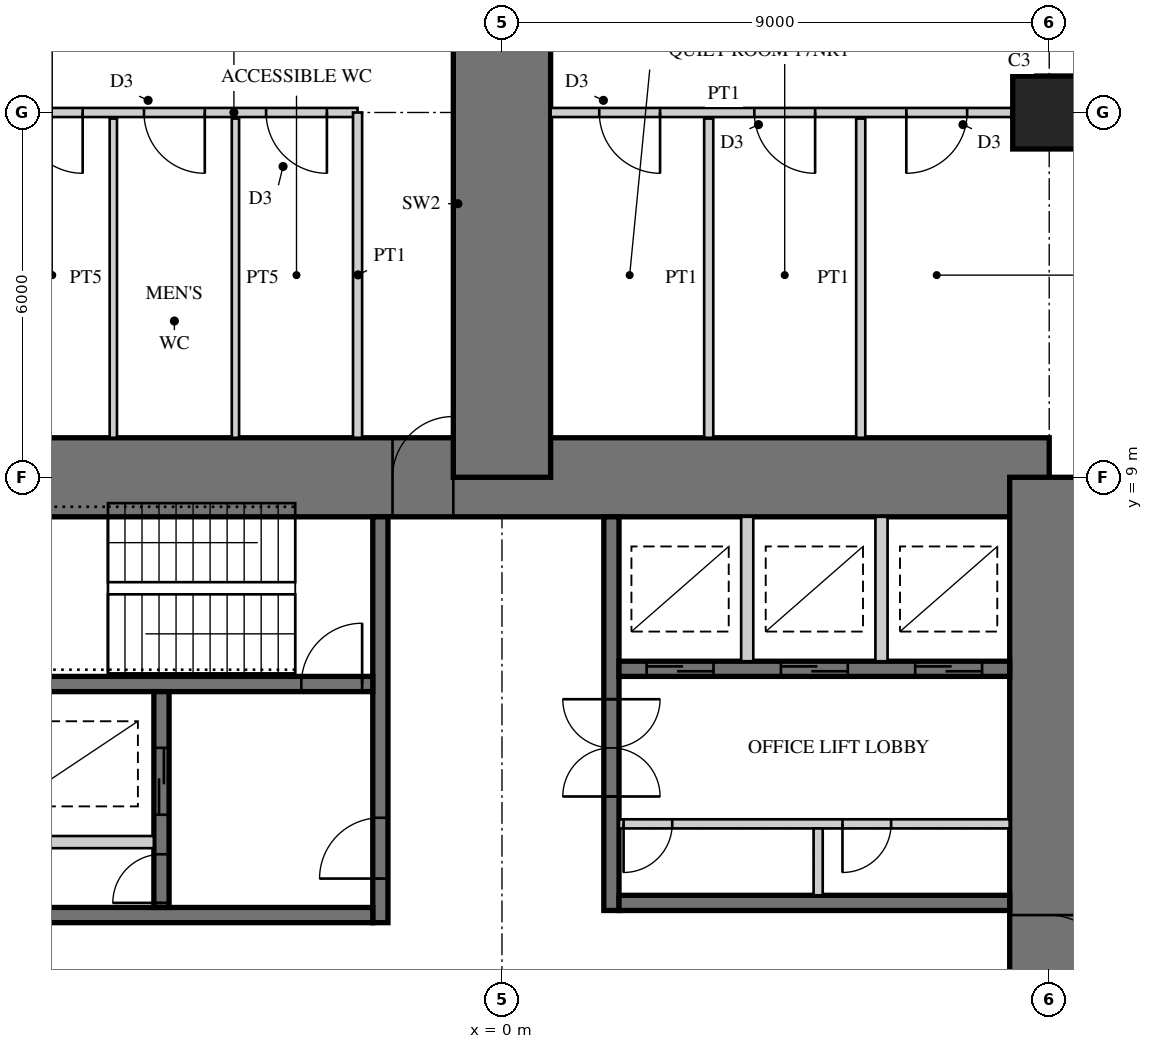
"""IFC4 building model, lengths in metres.
Left out: names, types, materials, properties, quantities, classifications, styles, units other than length and angle.
Written with IfcOpenShell. Run it as: python <this file> out.ifc"""

import sys

from ifc_helpers import new_model, si_unit, direction, frame, frame_2d, origin, origin_2d, place, context, subcontext, project, spatial, rectangle, extrude, element, fill, save


model = new_model("IFC4")
c1 = context("Model", 3, precision=1e-05, world=origin(), true_north=direction((0.0, 1.0)))
c2 = subcontext(c1, "Body", "Model", "MODEL_VIEW")
j1 = project(units=[si_unit("LENGTHUNIT", "METRE"), si_unit("PLANEANGLEUNIT", "RADIAN")], contexts=[c1])
p1 = place(None, origin())
s1 = spatial("IfcSite", under=j1, at=p1, CompositionType="ELEMENT")
p2 = place(p1, origin())
s2 = spatial("IfcBuilding", under=s1, at=p2, CompositionType="ELEMENT")
p3 = place(p2, frame((0.0, 0.0, 71.5)))
s3 = spatial("IfcBuildingStorey", under=s2, at=p3, CompositionType="ELEMENT", Elevation=71.5)
p4 = place(p3, frame((9.0, 9.0, 0.0), z_axis=(0.0, 0.0, 1.0), x_axis=(-1.0, 0.0, 0.0)))
e1 = element("IfcWall", 1, at=p4, inside=s3, PredefinedType="SHEAR", context=c2, shape_type="SweptSolid", body=[
    extrude(rectangle(XDim=18.0, YDim=1.3, at=frame_2d((9.0, 0.0))), origin(), (0.0, 0.0, 1.0), 4.0),
])
p5 = place(p4, frame((9.8, 0.0, 0.0)))
e2 = element("IfcOpeningElement", 2, at=p5, cuts=e1, PredefinedType="OPENING", context=c2, shape_type="SweptSolid", body=[
    extrude(rectangle(XDim=1.0, YDim=2.4, at=frame_2d((0.5, 1.2))), frame((0.0, 0.66, 0.0), z_axis=(0.0, -1.0, 0.0), x_axis=(1.0, 0.0, 0.0)), (0.0, 0.0, 1.0), 1.32),
])
p6 = place(p3, frame((9.0, -9.0, 0.0), z_axis=(0.0, 0.0, 1.0), x_axis=(0.0, 1.0, 0.0)))
e3 = element("IfcWall", 3, at=p6, inside=s3, PredefinedType="SHEAR", context=c2, shape_type="SweptSolid", body=[
    extrude(rectangle(XDim=18.0, YDim=1.3, at=frame_2d((9.0, 0.0))), origin(), (0.0, 0.0, 1.0), 4.0),
])
p7 = place(p6, frame((9.8, 0.0, 0.0)))
e4 = element("IfcOpeningElement", 4, at=p7, cuts=e3, PredefinedType="OPENING", context=c2, shape_type="SweptSolid", body=[
    extrude(rectangle(XDim=1.0, YDim=2.4, at=frame_2d((0.5, 1.2))), frame((0.0, 0.66, 0.0), z_axis=(0.0, -1.0, 0.0), x_axis=(1.0, 0.0, 0.0)), (0.0, 0.0, 1.0), 1.32),
])
p8 = place(p3, frame((1.8, 1.875, 0.0), z_axis=(0.0, 0.0, 1.0), x_axis=(0.0, 1.0, 0.0)))
e5 = element("IfcWall", 5, at=p8, inside=s3, PredefinedType="SHEAR", context=c2, shape_type="SweptSolid", body=[
    extrude(rectangle(XDim=6.475, YDim=0.25, at=frame_2d((3.238, 0.0))), origin(), (0.0, 0.0, 1.0), 4.0),
])
p9 = place(p8, frame((1.875, 0.0, 0.0)))
e6 = element("IfcOpeningElement", 6, at=p9, cuts=e5, PredefinedType="OPENING", context=c2, shape_type="SweptSolid", body=[
    extrude(rectangle(XDim=1.6, YDim=2.4, at=frame_2d((0.8, 1.2))), frame((0.0, 0.135, 0.0), z_axis=(0.0, -1.0, 0.0), x_axis=(1.0, 0.0, 0.0)), (0.0, 0.0, 1.0), 0.27),
])
p10 = place(p3, frame((1.925, 2.0, 0.0), z_axis=(0.0, 0.0, 1.0), x_axis=(1.0, 0.0, 0.0)))
e7 = element("IfcWall", 7, at=p10, inside=s3, PredefinedType="SHEAR", context=c2, shape_type="SweptSolid", body=[
    extrude(rectangle(XDim=6.425, YDim=0.25, at=frame_2d((3.212, 0.0))), origin(), (0.0, 0.0, 1.0), 4.0),
])
p11 = place(p3, frame((1.925, 5.85, 0.0), z_axis=(0.0, 0.0, 1.0), x_axis=(1.0, 0.0, 0.0)))
e8 = element("IfcWall", 8, at=p11, inside=s3, PredefinedType="SHEAR", context=c2, shape_type="SweptSolid", body=[
    extrude(rectangle(XDim=6.425, YDim=0.25, at=frame_2d((3.212, 0.0))), origin(), (0.0, 0.0, 1.0), 4.0),
])
p12 = place(p11, frame((0.454, 0.0, 0.0)))
e9 = element("IfcOpeningElement", 9, at=p12, cuts=e8, PredefinedType="OPENING", context=c2, shape_type="SweptSolid", body=[
    extrude(rectangle(XDim=1.1, YDim=2.2, at=frame_2d((0.55, 1.1))), frame((0.0, 0.135, 0.0), z_axis=(0.0, -1.0, 0.0), x_axis=(1.0, 0.0, 0.0)), (0.0, 0.0, 1.0), 0.27),
])
p13 = place(p11, frame((2.663, 0.0, 0.0)))
e10 = element("IfcOpeningElement", 10, at=p13, cuts=e8, PredefinedType="OPENING", context=c2, shape_type="SweptSolid", body=[
    extrude(rectangle(XDim=1.1, YDim=2.2, at=frame_2d((0.55, 1.1))), frame((0.0, 0.135, 0.0), z_axis=(0.0, -1.0, 0.0), x_axis=(1.0, 0.0, 0.0)), (0.0, 0.0, 1.0), 0.27),
])
p14 = place(p11, frame((4.871, 0.0, 0.0)))
e11 = element("IfcOpeningElement", 11, at=p14, cuts=e8, PredefinedType="OPENING", context=c2, shape_type="SweptSolid", body=[
    extrude(rectangle(XDim=1.1, YDim=2.2, at=frame_2d((0.55, 1.1))), frame((0.0, 0.135, 0.0), z_axis=(0.0, -1.0, 0.0), x_axis=(1.0, 0.0, 0.0)), (0.0, 0.0, 1.0), 0.27),
])
p15 = place(p3, frame((1.925, 3.3, 0.0), z_axis=(0.0, 0.0, 1.0), x_axis=(1.0, 0.0, 0.0)))
e12 = element("IfcWall", 12, at=p15, inside=s3, PredefinedType="PARTITIONING", context=c2, shape_type="SweptSolid", body=[
    extrude(rectangle(XDim=6.425, YDim=0.15, at=frame_2d((3.212, 0.0))), origin(), (0.0, 0.0, 1.0), 4.0),
])
p16 = place(p15, frame((0.075, 0.0, 0.0)))
e13 = element("IfcOpeningElement", 13, at=p16, cuts=e12, PredefinedType="OPENING", context=c2, shape_type="SweptSolid", body=[
    extrude(rectangle(XDim=0.8, YDim=2.1, at=frame_2d((0.4, 1.05))), frame((0.0, 0.085, 0.0), z_axis=(0.0, -1.0, 0.0), x_axis=(1.0, 0.0, 0.0)), (0.0, 0.0, 1.0), 0.17),
])
p17 = place(p15, frame((3.675, 0.0, 0.0)))
e14 = element("IfcOpeningElement", 14, at=p17, cuts=e12, PredefinedType="OPENING", context=c2, shape_type="SweptSolid", body=[
    extrude(rectangle(XDim=0.8, YDim=2.1, at=frame_2d((0.4, 1.05))), frame((0.0, 0.085, 0.0), z_axis=(0.0, -1.0, 0.0), x_axis=(1.0, 0.0, 0.0)), (0.0, 0.0, 1.0), 0.17),
])
p18 = place(p3, frame((5.2, 2.125, 0.0), z_axis=(0.0, 0.0, 1.0), x_axis=(0.0, 1.0, 0.0)))
e15 = element("IfcWall", 15, at=p18, inside=s3, PredefinedType="PARTITIONING", context=c2, shape_type="SweptSolid", body=[
    extrude(rectangle(XDim=1.1, YDim=0.15, at=frame_2d((0.55, 0.0))), origin(), (0.0, 0.0, 1.0), 4.0),
])
for number, where, z_axis, x_axis in (
    (16, (4.033, 5.975, 0.0), (0.0, 0.0, 1.0), (0.0, 1.0, 0.0)),
    (17, (6.242, 5.975, 0.0), (0.0, 0.0, 1.0), (0.0, 1.0, 0.0)),
):
    element("IfcWall", number, at=place(p3, frame(where, z_axis=z_axis, x_axis=x_axis)), inside=s3, PredefinedType="PARTITIONING", context=c2, shape_type="SweptSolid", body=[
        extrude(rectangle(XDim=2.375, YDim=0.2, at=frame_2d((1.188, 0.0))), origin(), (0.0, 0.0, 1.0), 4.0),
    ])
p19 = place(p3, frame((-2.0, 1.675, 0.0), z_axis=(0.0, 0.0, 1.0), x_axis=(0.0, 1.0, 0.0)))
e18 = element("IfcWall", 18, at=p19, inside=s3, PredefinedType="SHEAR", context=c2, shape_type="SweptSolid", body=[
    extrude(rectangle(XDim=6.675, YDim=0.25, at=frame_2d((3.337, 0.0))), origin(), (0.0, 0.0, 1.0), 4.0),
])
p20 = place(p19, frame((0.725, 0.0, 0.0)))
e19 = element("IfcOpeningElement", 19, at=p20, cuts=e18, PredefinedType="OPENING", context=c2, shape_type="SweptSolid", body=[
    extrude(rectangle(XDim=1.0, YDim=2.1, at=frame_2d((0.5, 1.05))), frame((0.0, 0.135, 0.0), z_axis=(0.0, -1.0, 0.0), x_axis=(1.0, 0.0, 0.0)), (0.0, 0.0, 1.0), 0.27),
])
p21 = place(p3, frame((-2.125, 1.8, 0.0), z_axis=(0.0, 0.0, 1.0), x_axis=(-1.0, 0.0, 0.0)))
e20 = element("IfcWall", 20, at=p21, inside=s3, PredefinedType="SHEAR", context=c2, shape_type="SweptSolid", body=[
    extrude(rectangle(XDim=6.225, YDim=0.25, at=frame_2d((3.113, 0.0))), origin(), (0.0, 0.0, 1.0), 4.0),
])
p22 = place(p3, frame((-2.125, 5.6, 0.0), z_axis=(0.0, 0.0, 1.0), x_axis=(-1.0, 0.0, 0.0)))
e21 = element("IfcWall", 21, at=p22, inside=s3, PredefinedType="SHEAR", context=c2, shape_type="SweptSolid", body=[
    extrude(rectangle(XDim=6.225, YDim=0.25, at=frame_2d((3.113, 0.0))), origin(), (0.0, 0.0, 1.0), 4.0),
])
p23 = place(p22, frame((0.175, 0.0, 0.0)))
e22 = element("IfcOpeningElement", 22, at=p23, cuts=e21, PredefinedType="OPENING", context=c2, shape_type="SweptSolid", body=[
    extrude(rectangle(XDim=1.0, YDim=2.1, at=frame_2d((0.5, 1.05))), frame((0.0, 0.135, 0.0), z_axis=(0.0, -1.0, 0.0), x_axis=(1.0, 0.0, 0.0)), (0.0, 0.0, 1.0), 0.27),
])
p24 = place(p3, frame((-5.6, 1.925, 0.0), z_axis=(0.0, 0.0, 1.0), x_axis=(0.0, 1.0, 0.0)))
e23 = element("IfcWall", 23, at=p24, inside=s3, PredefinedType="SHEAR", context=c2, shape_type="SweptSolid", body=[
    extrude(rectangle(XDim=3.55, YDim=0.25, at=frame_2d((1.775, 0.0))), origin(), (0.0, 0.0, 1.0), 4.0),
])
p25 = place(p24, frame((1.525, 0.0, 0.0)))
e24 = element("IfcOpeningElement", 24, at=p25, cuts=e23, PredefinedType="OPENING", context=c2, shape_type="SweptSolid", body=[
    extrude(rectangle(XDim=1.1, YDim=2.2, at=frame_2d((0.55, 1.1))), frame((0.0, 0.135, 0.0), z_axis=(0.0, -1.0, 0.0), x_axis=(1.0, 0.0, 0.0)), (0.0, 0.0, 1.0), 0.27),
])
p26 = place(p24, frame((0.075, 0.0, 0.0)))
e25 = element("IfcOpeningElement", 25, at=p26, cuts=e23, PredefinedType="OPENING", context=c2, shape_type="SweptSolid", body=[
    extrude(rectangle(XDim=0.8, YDim=2.1, at=frame_2d((0.4, 1.05))), frame((0.0, 0.135, 0.0), z_axis=(0.0, -1.0, 0.0), x_axis=(1.0, 0.0, 0.0)), (0.0, 0.0, 1.0), 0.27),
])
p27 = place(p3, frame((-5.725, 3.0, 0.0), z_axis=(0.0, 0.0, 1.0), x_axis=(-1.0, 0.0, 0.0)))
e26 = element("IfcWall", 26, at=p27, inside=s3, PredefinedType="PARTITIONING", context=c2, shape_type="SweptSolid", body=[
    extrude(rectangle(XDim=2.625, YDim=0.2, at=frame_2d((1.312, 0.0))), origin(), (0.0, 0.0, 1.0), 4.0),
])
p28 = place(p3, frame((0.0, 9.0, 0.0), z_axis=(0.0, 0.0, 1.0), x_axis=(0.0, 1.0, 0.0)))
e27 = element("IfcWall", 27, at=p28, inside=s3, PredefinedType="SHEAR", context=c2, shape_type="SweptSolid", body=[
    extrude(rectangle(XDim=9.0, YDim=1.6, at=frame_2d((4.5, 0.0))), origin(), (0.0, 0.0, 1.0), 4.0),
])
p29 = place(p3, frame((9.0, 15.0, 0.0), z_axis=(0.0, 0.0, 1.0), x_axis=(1.0, 0.0, 0.0)))
e28 = element("IfcColumn", 28, at=p29, inside=s3, PredefinedType="COLUMN", context=c2, shape_type="SweptSolid", body=[
    extrude(rectangle(XDim=1.2, YDim=1.2, at=origin_2d()), origin(), (0.0, 0.0, 1.0), 4.0),
])
p30 = place(p3, frame((-2.375, 15.0, 0.0), z_axis=(0.0, 0.0, 1.0), x_axis=(-1.0, 0.0, 0.0)))
e29 = element("IfcWall", 29, at=p30, inside=s3, PredefinedType="PARTITIONING", context=c2, shape_type="SweptSolid", body=[
    extrude(rectangle(XDim=6.025, YDim=0.15, at=frame_2d((3.012, 0.0))), origin(), (0.0, 0.0, 1.0), 2.95),
])
p31 = place(p30, frame((0.504, 0.0, 0.0)))
e30 = element("IfcOpeningElement", 30, at=p31, cuts=e29, PredefinedType="OPENING", context=c2, shape_type="SweptSolid", body=[
    extrude(rectangle(XDim=1.0, YDim=2.1, at=frame_2d((0.5, 1.05))), frame((0.0, 0.085, 0.0), z_axis=(0.0, -1.0, 0.0), x_axis=(1.0, 0.0, 0.0)), (0.0, 0.0, 1.0), 0.17),
])
p32 = place(p30, frame((2.512, 0.0, 0.0)))
e31 = element("IfcOpeningElement", 31, at=p32, cuts=e29, PredefinedType="OPENING", context=c2, shape_type="SweptSolid", body=[
    extrude(rectangle(XDim=1.0, YDim=2.1, at=frame_2d((0.5, 1.05))), frame((0.0, 0.085, 0.0), z_axis=(0.0, -1.0, 0.0), x_axis=(1.0, 0.0, 0.0)), (0.0, 0.0, 1.0), 0.17),
])
p33 = place(p30, frame((4.521, 0.0, 0.0)))
e32 = element("IfcOpeningElement", 32, at=p33, cuts=e29, PredefinedType="OPENING", context=c2, shape_type="SweptSolid", body=[
    extrude(rectangle(XDim=1.0, YDim=2.1, at=frame_2d((0.5, 1.05))), frame((0.0, 0.085, 0.0), z_axis=(0.0, -1.0, 0.0), x_axis=(1.0, 0.0, 0.0)), (0.0, 0.0, 1.0), 0.17),
])
p34 = place(p3, frame((-2.375, 9.65, 0.0), z_axis=(0.0, 0.0, 1.0), x_axis=(0.0, 1.0, 0.0)))
e33 = element("IfcWall", 33, at=p34, inside=s3, PredefinedType="PARTITIONING", context=c2, shape_type="SweptSolid", body=[
    extrude(rectangle(XDim=5.35, YDim=0.15, at=frame_2d((2.675, 0.0))), origin(), (0.0, 0.0, 1.0), 3.8),
])
for number, where, z_axis, x_axis in (
    (34, (-4.383, 9.65, 0.0), (0.0, 0.0, 1.0), (0.0, 1.0, 0.0)),
    (35, (-6.392, 9.65, 0.0), (0.0, 0.0, 1.0), (0.0, 1.0, 0.0)),
):
    element("IfcWall", number, at=place(p3, frame(where, z_axis=z_axis, x_axis=x_axis)), inside=s3, PredefinedType="PLUMBINGWALL", context=c2, shape_type="SweptSolid", body=[
        extrude(rectangle(XDim=5.25, YDim=0.12, at=frame_2d((2.625, 0.0))), origin(), (0.0, 0.0, 1.0), 3.8),
    ])
p35 = place(p3, frame((8.4, 15.0, 0.0), z_axis=(0.0, 0.0, 1.0), x_axis=(-1.0, 0.0, 0.0)))
e36 = element("IfcWall", 36, at=p35, inside=s3, PredefinedType="PARTITIONING", context=c2, shape_type="SweptSolid", body=[
    extrude(rectangle(XDim=7.6, YDim=0.15, at=frame_2d((3.8, 0.0))), origin(), (0.0, 0.0, 1.0), 2.95),
])
p36 = place(p35, frame((0.75, 0.0, 0.0)))
e37 = element("IfcOpeningElement", 37, at=p36, cuts=e36, PredefinedType="OPENING", context=c2, shape_type="SweptSolid", body=[
    extrude(rectangle(XDim=1.0, YDim=2.1, at=frame_2d((0.5, 1.05))), frame((0.0, 0.085, 0.0), z_axis=(0.0, -1.0, 0.0), x_axis=(1.0, 0.0, 0.0)), (0.0, 0.0, 1.0), 0.17),
])
p37 = place(p35, frame((3.25, 0.0, 0.0)))
e38 = element("IfcOpeningElement", 38, at=p37, cuts=e36, PredefinedType="OPENING", context=c2, shape_type="SweptSolid", body=[
    extrude(rectangle(XDim=1.0, YDim=2.1, at=frame_2d((0.5, 1.05))), frame((0.0, 0.085, 0.0), z_axis=(0.0, -1.0, 0.0), x_axis=(1.0, 0.0, 0.0)), (0.0, 0.0, 1.0), 0.17),
])
p38 = place(p35, frame((5.8, 0.0, 0.0)))
e39 = element("IfcOpeningElement", 39, at=p38, cuts=e36, PredefinedType="OPENING", context=c2, shape_type="SweptSolid", body=[
    extrude(rectangle(XDim=1.0, YDim=2.1, at=frame_2d((0.5, 1.05))), frame((0.0, 0.085, 0.0), z_axis=(0.0, -1.0, 0.0), x_axis=(1.0, 0.0, 0.0)), (0.0, 0.0, 1.0), 0.17),
])
p39 = place(p3, frame((3.4, 9.65, 0.0), z_axis=(0.0, 0.0, 1.0), x_axis=(0.0, 1.0, 0.0)))
e40 = element("IfcWall", 40, at=p39, inside=s3, PredefinedType="PARTITIONING", context=c2, shape_type="SweptSolid", body=[
    extrude(rectangle(XDim=5.25, YDim=0.15, at=frame_2d((2.625, 0.0))), origin(), (0.0, 0.0, 1.0), 3.8),
])
p40 = place(p3, frame((5.9, 9.65, 0.0), z_axis=(0.0, 0.0, 1.0), x_axis=(0.0, 1.0, 0.0)))
e41 = element("IfcWall", 41, at=p40, inside=s3, PredefinedType="PARTITIONING", context=c2, shape_type="SweptSolid", body=[
    extrude(rectangle(XDim=5.25, YDim=0.15, at=frame_2d((2.625, 0.0))), origin(), (0.0, 0.0, 1.0), 3.0),
])
p41 = place(p31, origin())
e42 = element("IfcDoor", 42, at=p41, inside=s3, OperationType="SINGLE_SWING_LEFT", PredefinedType="DOOR", context=c2, shape_type="SweptSolid", body=[
    extrude(rectangle(XDim=1.0, YDim=2.1, at=frame_2d((0.5, 1.05))), frame((0.0, 0.025, 0.0), z_axis=(0.0, -1.0, 0.0), x_axis=(1.0, 0.0, 0.0)), (0.0, 0.0, 1.0), 0.05),
])
fill(e30, e42)
p42 = place(p32, origin())
e43 = element("IfcDoor", 43, at=p42, inside=s3, OperationType="SINGLE_SWING_LEFT", PredefinedType="DOOR", context=c2, shape_type="SweptSolid", body=[
    extrude(rectangle(XDim=1.0, YDim=2.1, at=frame_2d((0.5, 1.05))), frame((0.0, 0.025, 0.0), z_axis=(0.0, -1.0, 0.0), x_axis=(1.0, 0.0, 0.0)), (0.0, 0.0, 1.0), 0.05),
])
fill(e31, e43)
p43 = place(p33, origin())
e44 = element("IfcDoor", 44, at=p43, inside=s3, OperationType="SINGLE_SWING_LEFT", PredefinedType="DOOR", context=c2, shape_type="SweptSolid", body=[
    extrude(rectangle(XDim=1.0, YDim=2.1, at=frame_2d((0.5, 1.05))), frame((0.0, 0.025, 0.0), z_axis=(0.0, -1.0, 0.0), x_axis=(1.0, 0.0, 0.0)), (0.0, 0.0, 1.0), 0.05),
])
fill(e32, e44)
p44 = place(p36, origin())
e45 = element("IfcDoor", 45, at=p44, inside=s3, OperationType="SINGLE_SWING_RIGHT", PredefinedType="DOOR", context=c2, shape_type="SweptSolid", body=[
    extrude(rectangle(XDim=1.0, YDim=2.1, at=frame_2d((0.5, 1.05))), frame((0.0, 0.025, 0.0), z_axis=(0.0, -1.0, 0.0), x_axis=(1.0, 0.0, 0.0)), (0.0, 0.0, 1.0), 0.05),
])
fill(e37, e45)
p45 = place(p37, origin())
e46 = element("IfcDoor", 46, at=p45, inside=s3, OperationType="SINGLE_SWING_LEFT", PredefinedType="DOOR", context=c2, shape_type="SweptSolid", body=[
    extrude(rectangle(XDim=1.0, YDim=2.1, at=frame_2d((0.5, 1.05))), frame((0.0, 0.025, 0.0), z_axis=(0.0, -1.0, 0.0), x_axis=(1.0, 0.0, 0.0)), (0.0, 0.0, 1.0), 0.05),
])
fill(e38, e46)
p46 = place(p38, origin())
e47 = element("IfcDoor", 47, at=p46, inside=s3, OperationType="SINGLE_SWING_LEFT", PredefinedType="DOOR", context=c2, shape_type="SweptSolid", body=[
    extrude(rectangle(XDim=1.0, YDim=2.1, at=frame_2d((0.5, 1.05))), frame((0.0, 0.025, 0.0), z_axis=(0.0, -1.0, 0.0), x_axis=(1.0, 0.0, 0.0)), (0.0, 0.0, 1.0), 0.05),
])
fill(e39, e47)
p47 = place(p5, frame((1.0, 0.0, 0.0), z_axis=(0.0, 0.0, 1.0), x_axis=(-1.0, 0.0, 0.0)))
e48 = element("IfcDoor", 48, at=p47, inside=s3, OperationType="SINGLE_SWING_RIGHT", PredefinedType="DOOR", context=c2, shape_type="SweptSolid", body=[
    extrude(rectangle(XDim=1.0, YDim=2.4, at=frame_2d((0.5, 1.2))), frame((0.0, -0.005, 0.0), z_axis=(0.0, -1.0, 0.0), x_axis=(1.0, 0.0, 0.0)), (0.0, 0.0, 1.0), 0.05),
])
fill(e2, e48)
p48 = place(p7, frame((1.0, 0.0, 0.0), z_axis=(0.0, 0.0, 1.0), x_axis=(-1.0, 0.0, 0.0)))
e49 = element("IfcDoor", 49, at=p48, inside=s3, OperationType="SINGLE_SWING_RIGHT", PredefinedType="DOOR", context=c2, shape_type="SweptSolid", body=[
    extrude(rectangle(XDim=1.0, YDim=2.4, at=frame_2d((0.5, 1.2))), frame((0.0, -0.005, 0.0), z_axis=(0.0, -1.0, 0.0), x_axis=(1.0, 0.0, 0.0)), (0.0, 0.0, 1.0), 0.05),
])
fill(e4, e49)
p49 = place(p12, origin())
e50 = element("IfcDoor", 50, at=p49, inside=s3, OperationType="DOUBLE_DOOR_SLIDING", PredefinedType="DOOR", context=c2, shape_type="SweptSolid", body=[
    extrude(rectangle(XDim=1.1, YDim=2.2, at=frame_2d((0.55, 1.1))), frame((0.0, 0.025, 0.0), z_axis=(0.0, -1.0, 0.0), x_axis=(1.0, 0.0, 0.0)), (0.0, 0.0, 1.0), 0.05),
])
fill(e9, e50)
p50 = place(p13, origin())
e51 = element("IfcDoor", 51, at=p50, inside=s3, OperationType="DOUBLE_DOOR_SLIDING", PredefinedType="DOOR", context=c2, shape_type="SweptSolid", body=[
    extrude(rectangle(XDim=1.1, YDim=2.2, at=frame_2d((0.55, 1.1))), frame((0.0, 0.025, 0.0), z_axis=(0.0, -1.0, 0.0), x_axis=(1.0, 0.0, 0.0)), (0.0, 0.0, 1.0), 0.05),
])
fill(e10, e51)
p51 = place(p14, origin())
e52 = element("IfcDoor", 52, at=p51, inside=s3, OperationType="DOUBLE_DOOR_SLIDING", PredefinedType="DOOR", context=c2, shape_type="SweptSolid", body=[
    extrude(rectangle(XDim=1.1, YDim=2.2, at=frame_2d((0.55, 1.1))), frame((0.0, 0.025, 0.0), z_axis=(0.0, -1.0, 0.0), x_axis=(1.0, 0.0, 0.0)), (0.0, 0.0, 1.0), 0.05),
])
fill(e11, e52)
p52 = place(p9, origin())
e53 = element("IfcDoor", 53, at=p52, inside=s3, OperationType="DOUBLE_DOOR_DOUBLE_SWING", PredefinedType="DOOR", context=c2, shape_type="SweptSolid", body=[
    extrude(rectangle(XDim=1.6, YDim=2.4, at=frame_2d((0.8, 1.2))), frame((0.0, 0.025, 0.0), z_axis=(0.0, -1.0, 0.0), x_axis=(1.0, 0.0, 0.0)), (0.0, 0.0, 1.0), 0.05),
])
fill(e6, e53)
p53 = place(p16, frame((0.8, 0.0, 0.0), z_axis=(0.0, 0.0, 1.0), x_axis=(-1.0, 0.0, 0.0)))
e54 = element("IfcDoor", 54, at=p53, inside=s3, OperationType="SINGLE_SWING_RIGHT", PredefinedType="DOOR", context=c2, shape_type="SweptSolid", body=[
    extrude(rectangle(XDim=0.8, YDim=2.1, at=frame_2d((0.4, 1.05))), frame((0.0, 0.025, 0.0), z_axis=(0.0, -1.0, 0.0), x_axis=(1.0, 0.0, 0.0)), (0.0, 0.0, 1.0), 0.05),
])
fill(e13, e54)
p54 = place(p17, frame((0.8, 0.0, 0.0), z_axis=(0.0, 0.0, 1.0), x_axis=(-1.0, 0.0, 0.0)))
e55 = element("IfcDoor", 55, at=p54, inside=s3, OperationType="SINGLE_SWING_RIGHT", PredefinedType="DOOR", context=c2, shape_type="SweptSolid", body=[
    extrude(rectangle(XDim=0.8, YDim=2.1, at=frame_2d((0.4, 1.05))), frame((0.0, 0.025, 0.0), z_axis=(0.0, -1.0, 0.0), x_axis=(1.0, 0.0, 0.0)), (0.0, 0.0, 1.0), 0.05),
])
fill(e14, e55)
p55 = place(p20, origin())
e56 = element("IfcDoor", 56, at=p55, inside=s3, OperationType="SINGLE_SWING_LEFT", PredefinedType="DOOR", context=c2, shape_type="SweptSolid", body=[
    extrude(rectangle(XDim=1.0, YDim=2.1, at=frame_2d((0.5, 1.05))), frame((0.0, 0.025, 0.0), z_axis=(0.0, -1.0, 0.0), x_axis=(1.0, 0.0, 0.0)), (0.0, 0.0, 1.0), 0.05),
])
fill(e19, e56)
p56 = place(p23, frame((1.0, 0.0, 0.0), z_axis=(0.0, 0.0, 1.0), x_axis=(-1.0, 0.0, 0.0)))
e57 = element("IfcDoor", 57, at=p56, inside=s3, OperationType="SINGLE_SWING_RIGHT", PredefinedType="DOOR", context=c2, shape_type="SweptSolid", body=[
    extrude(rectangle(XDim=1.0, YDim=2.1, at=frame_2d((0.5, 1.05))), frame((0.0, 0.025, 0.0), z_axis=(0.0, -1.0, 0.0), x_axis=(1.0, 0.0, 0.0)), (0.0, 0.0, 1.0), 0.05),
])
fill(e22, e57)
p57 = place(p25, origin())
e58 = element("IfcDoor", 58, at=p57, inside=s3, OperationType="DOUBLE_DOOR_SLIDING", PredefinedType="DOOR", context=c2, shape_type="SweptSolid", body=[
    extrude(rectangle(XDim=1.1, YDim=2.2, at=frame_2d((0.55, 1.1))), frame((0.0, 0.025, 0.0), z_axis=(0.0, -1.0, 0.0), x_axis=(1.0, 0.0, 0.0)), (0.0, 0.0, 1.0), 0.05),
])
fill(e24, e58)
p58 = place(p26, origin())
e59 = element("IfcDoor", 59, at=p58, inside=s3, OperationType="SINGLE_SWING_LEFT", PredefinedType="DOOR", context=c2, shape_type="SweptSolid", body=[
    extrude(rectangle(XDim=0.8, YDim=2.1, at=frame_2d((0.4, 1.05))), frame((0.0, 0.025, 0.0), z_axis=(0.0, -1.0, 0.0), x_axis=(1.0, 0.0, 0.0)), (0.0, 0.0, 1.0), 0.05),
])
fill(e25, e59)
save(model, sys.argv[1])
